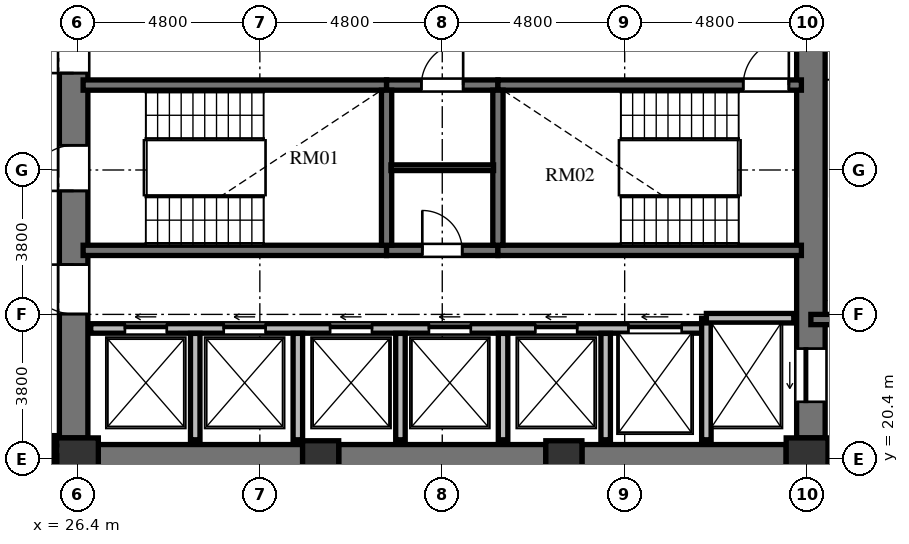
"""IFC4 building model, lengths in metres.
Left out: names, types, materials, properties, quantities, classifications, styles, units other than length and angle.
Written with IfcOpenShell. Run it as: python <this file> out.ifc"""

import sys

from ifc_helpers import new_model, si_unit, direction, frame, frame_2d, origin, origin_2d, place, context, subcontext, project, spatial, rectangle, extrude, element, fill, save


model = new_model("IFC4")
c1 = context("Model", 3, precision=1e-05, world=origin(), true_north=direction((0.0, 1.0)))
c2 = subcontext(c1, "Body", "Model", "MODEL_VIEW")
j1 = project(units=[si_unit("LENGTHUNIT", "METRE"), si_unit("PLANEANGLEUNIT", "RADIAN")], contexts=[c1])
p1 = place(None, origin())
s1 = spatial("IfcSite", under=j1, at=p1, CompositionType="ELEMENT")
p2 = place(p1, origin())
s2 = spatial("IfcBuilding", under=s1, at=p2, CompositionType="ELEMENT")
p3 = place(p2, frame((0.0, 0.0, 85.392)))
s3 = spatial("IfcBuildingStorey", under=s2, at=p3, CompositionType="ELEMENT", Elevation=85.392)
p4 = place(p3, frame((26.4, 20.4, 0.0), z_axis=(0.0, 0.0, 1.0), x_axis=(1.0, 0.0, 0.0)))
e1 = element("IfcColumn", 1, at=p4, inside=s3, PredefinedType="COLUMN", context=c2, shape_type="SweptSolid", body=[
    extrude(rectangle(XDim=1.1, YDim=1.1, at=origin_2d()), origin(), (0.0, 0.0, 1.0), 3.648),
])
for number, where, z_axis, x_axis in (
    (2, (32.8, 20.4, 0.0), (0.0, 0.0, 1.0), (1.0, 0.0, 0.0)),
    (3, (39.2, 20.4, 0.0), (0.0, 0.0, 1.0), (1.0, 0.0, 0.0)),
):
    element("IfcColumn", number, at=place(p3, frame(where, z_axis=z_axis, x_axis=x_axis)), inside=s3, PredefinedType="COLUMN", context=c2, shape_type="SweptSolid", body=[
        extrude(rectangle(XDim=0.95, YDim=0.95, at=origin_2d()), origin(), (0.0, 0.0, 1.0), 3.648),
    ])
p5 = place(p3, frame((45.6, 20.4, 0.0), z_axis=(0.0, 0.0, 1.0), x_axis=(1.0, 0.0, 0.0)))
e4 = element("IfcColumn", 4, at=p5, inside=s3, PredefinedType="COLUMN", context=c2, shape_type="SweptSolid", body=[
    extrude(rectangle(XDim=1.1, YDim=1.1, at=origin_2d()), origin(), (0.0, 0.0, 1.0), 3.648),
])
p6 = place(p3, frame((26.3, 20.95, 0.0), z_axis=(0.0, 0.0, 1.0), x_axis=(0.0, 1.0, 0.0)))
e5 = element("IfcWall", 5, at=p6, inside=s3, PredefinedType="SHEAR", context=c2, shape_type="SweptSolid", body=[
    extrude(rectangle(XDim=14.1, YDim=0.75, at=frame_2d((7.05, 0.0))), origin(), (0.0, 0.0, 1.0), 3.648),
])
p7 = place(p6, frame((6.5, 0.0, 0.0)))
e6 = element("IfcOpeningElement", 6, at=p7, cuts=e5, PredefinedType="OPENING", context=c2, shape_type="SweptSolid", body=[
    extrude(rectangle(XDim=1.2, YDim=2.15, at=frame_2d((0.6, 1.075))), frame((0.0, 0.385, 0.0), z_axis=(0.0, -1.0, 0.0), x_axis=(1.0, 0.0, 0.0)), (0.0, 0.0, 1.0), 0.77),
])
p8 = place(p6, frame((9.6, 0.0, 0.0)))
e7 = element("IfcOpeningElement", 7, at=p8, cuts=e5, PredefinedType="OPENING", context=c2, shape_type="SweptSolid", body=[
    extrude(rectangle(XDim=1.3, YDim=2.2, at=frame_2d((0.65, 1.1))), frame((0.0, 0.385, 0.0), z_axis=(0.0, -1.0, 0.0), x_axis=(1.0, 0.0, 0.0)), (0.0, 0.0, 1.0), 0.77),
])
p9 = place(p6, frame((3.26, 0.0, 0.0)))
e8 = element("IfcOpeningElement", 8, at=p9, cuts=e5, PredefinedType="OPENING", context=c2, shape_type="SweptSolid", body=[
    extrude(rectangle(XDim=1.3, YDim=2.2, at=frame_2d((0.65, 1.1))), frame((0.0, 0.385, 0.0), z_axis=(0.0, -1.0, 0.0), x_axis=(1.0, 0.0, 0.0)), (0.0, 0.0, 1.0), 0.77),
])
p10 = place(p3, frame((45.7, 20.95, 0.0), z_axis=(0.0, 0.0, 1.0), x_axis=(0.0, 1.0, 0.0)))
e9 = element("IfcWall", 9, at=p10, inside=s3, PredefinedType="SHEAR", context=c2, shape_type="SweptSolid", body=[
    extrude(rectangle(XDim=14.1, YDim=0.75, at=frame_2d((7.05, 0.0))), origin(), (0.0, 0.0, 1.0), 3.648),
])
p11 = place(p10, frame((11.75, 0.0, 0.0)))
e10 = element("IfcOpeningElement", 10, at=p11, cuts=e9, PredefinedType="OPENING", context=c2, shape_type="SweptSolid", body=[
    extrude(rectangle(XDim=1.4, YDim=2.3, at=frame_2d((0.7, 1.15))), frame((0.0, 0.385, 0.0), z_axis=(0.0, -1.0, 0.0), x_axis=(1.0, 0.0, 0.0)), (0.0, 0.0, 1.0), 0.77),
])
p12 = place(p10, frame((0.95, 0.0, 0.0)))
e11 = element("IfcOpeningElement", 11, at=p12, cuts=e9, PredefinedType="OPENING", context=c2, shape_type="SweptSolid", body=[
    extrude(rectangle(XDim=1.4, YDim=2.3, at=frame_2d((0.7, 1.15))), frame((0.0, 0.385, 0.0), z_axis=(0.0, -1.0, 0.0), x_axis=(1.0, 0.0, 0.0)), (0.0, 0.0, 1.0), 0.77),
])
p13 = place(p3, frame((26.95, 20.4, 0.0), z_axis=(0.0, 0.0, 1.0), x_axis=(1.0, 0.0, 0.0)))
e12 = element("IfcWall", 12, at=p13, inside=s3, PredefinedType="SHEAR", context=c2, shape_type="SweptSolid", body=[
    extrude(rectangle(XDim=5.375, YDim=0.75, at=frame_2d((2.688, 0.0))), origin(), (0.0, 0.0, 1.0), 3.648),
])
p14 = place(p3, frame((33.275, 20.4, 0.0), z_axis=(0.0, 0.0, 1.0), x_axis=(1.0, 0.0, 0.0)))
e13 = element("IfcWall", 13, at=p14, inside=s3, PredefinedType="SHEAR", context=c2, shape_type="SweptSolid", body=[
    extrude(rectangle(XDim=5.45, YDim=0.75, at=frame_2d((2.725, 0.0))), origin(), (0.0, 0.0, 1.0), 3.648),
])
p15 = place(p3, frame((39.675, 20.4, 0.0), z_axis=(0.0, 0.0, 1.0), x_axis=(1.0, 0.0, 0.0)))
e14 = element("IfcWall", 14, at=p15, inside=s3, PredefinedType="SHEAR", context=c2, shape_type="SweptSolid", body=[
    extrude(rectangle(XDim=5.375, YDim=0.75, at=frame_2d((2.688, 0.0))), origin(), (0.0, 0.0, 1.0), 3.648),
])
p16 = place(p3, frame((26.55, 30.235, 0.0), z_axis=(0.0, 0.0, 1.0), x_axis=(1.0, 0.0, 0.0)))
e15 = element("IfcWall", 15, at=p16, inside=s3, PredefinedType="SHEAR", context=c2, shape_type="SweptSolid", body=[
    extrude(rectangle(XDim=7.985, YDim=0.27, at=frame_2d((3.992, 0.0))), origin(), (0.0, 0.0, 1.0), 3.648),
])
p17 = place(p3, frame((34.535, 30.235, 0.0), z_axis=(0.0, 0.0, 1.0), x_axis=(1.0, 0.0, 0.0)))
e16 = element("IfcWall", 16, at=p17, inside=s3, PredefinedType="SHEAR", context=c2, shape_type="SweptSolid", body=[
    extrude(rectangle(XDim=2.93, YDim=0.27, at=frame_2d((1.465, 0.0))), origin(), (0.0, 0.0, 1.0), 3.648),
])
p18 = place(p17, frame((0.915, 0.0, 0.0)))
e17 = element("IfcOpeningElement", 17, at=p18, cuts=e16, PredefinedType="OPENING", context=c2, shape_type="SweptSolid", body=[
    extrude(rectangle(XDim=1.1, YDim=2.15, at=frame_2d((0.55, 1.075))), frame((0.0, 0.145, 0.0), z_axis=(0.0, -1.0, 0.0), x_axis=(1.0, 0.0, 0.0)), (0.0, 0.0, 1.0), 0.29),
])
p19 = place(p3, frame((37.465, 30.235, 0.0), z_axis=(0.0, 0.0, 1.0), x_axis=(1.0, 0.0, 0.0)))
e18 = element("IfcWall", 18, at=p19, inside=s3, PredefinedType="SHEAR", context=c2, shape_type="SweptSolid", body=[
    extrude(rectangle(XDim=7.985, YDim=0.27, at=frame_2d((3.992, 0.0))), origin(), (0.0, 0.0, 1.0), 3.648),
])
p20 = place(p19, frame((6.455, 0.0, 0.0)))
e19 = element("IfcOpeningElement", 19, at=p20, cuts=e18, PredefinedType="OPENING", context=c2, shape_type="SweptSolid", body=[
    extrude(rectangle(XDim=1.2, YDim=2.15, at=frame_2d((0.6, 1.075))), frame((0.0, 0.145, 0.0), z_axis=(0.0, -1.0, 0.0), x_axis=(1.0, 0.0, 0.0)), (0.0, 0.0, 1.0), 0.29),
])
p21 = place(p3, frame((26.55, 25.885, 0.0), z_axis=(0.0, 0.0, 1.0), x_axis=(1.0, 0.0, 0.0)))
e20 = element("IfcWall", 20, at=p21, inside=s3, PredefinedType="SHEAR", context=c2, shape_type="SweptSolid", body=[
    extrude(rectangle(XDim=7.985, YDim=0.27, at=frame_2d((3.992, 0.0))), origin(), (0.0, 0.0, 1.0), 3.648),
])
p22 = place(p3, frame((34.535, 25.885, 0.0), z_axis=(0.0, 0.0, 1.0), x_axis=(1.0, 0.0, 0.0)))
e21 = element("IfcWall", 21, at=p22, inside=s3, PredefinedType="SHEAR", context=c2, shape_type="SweptSolid", body=[
    extrude(rectangle(XDim=2.93, YDim=0.27, at=frame_2d((1.465, 0.0))), origin(), (0.0, 0.0, 1.0), 3.648),
])
p23 = place(p22, frame((0.94, 0.0, 0.0)))
e22 = element("IfcOpeningElement", 22, at=p23, cuts=e21, PredefinedType="OPENING", context=c2, shape_type="SweptSolid", body=[
    extrude(rectangle(XDim=1.05, YDim=2.15, at=frame_2d((0.525, 1.075))), frame((0.0, 0.145, 0.0), z_axis=(0.0, -1.0, 0.0), x_axis=(1.0, 0.0, 0.0)), (0.0, 0.0, 1.0), 0.29),
])
p24 = place(p3, frame((37.465, 25.885, 0.0), z_axis=(0.0, 0.0, 1.0), x_axis=(1.0, 0.0, 0.0)))
e23 = element("IfcWall", 23, at=p24, inside=s3, PredefinedType="SHEAR", context=c2, shape_type="SweptSolid", body=[
    extrude(rectangle(XDim=7.985, YDim=0.27, at=frame_2d((3.992, 0.0))), origin(), (0.0, 0.0, 1.0), 3.648),
])
for number, where, z_axis, x_axis in (
    (24, (34.535, 26.02, 0.0), (0.0, 0.0, 1.0), (0.0, 1.0, 0.0)),
    (25, (37.465, 26.02, 0.0), (0.0, 0.0, 1.0), (0.0, 1.0, 0.0)),
):
    element("IfcWall", number, at=place(p3, frame(where, z_axis=z_axis, x_axis=x_axis)), inside=s3, PredefinedType="SHEAR", context=c2, shape_type="SweptSolid", body=[
        extrude(rectangle(XDim=4.08, YDim=0.27, at=frame_2d((2.04, 0.0))), origin(), (0.0, 0.0, 1.0), 3.648),
    ])
p25 = place(p3, frame((34.65, 28.06, 0.0), z_axis=(0.0, 0.0, 1.0), x_axis=(1.0, 0.0, 0.0)))
e26 = element("IfcWall", 26, at=p25, inside=s3, PredefinedType="PARTITIONING", context=c2, shape_type="SweptSolid", body=[
    extrude(rectangle(XDim=2.7, YDim=0.15, at=frame_2d((1.35, 0.0))), origin(), (0.0, 0.0, 1.0), 3.428),
])
p26 = place(p3, frame((26.75, 23.83, 0.0), z_axis=(0.0, 0.0, 1.0), x_axis=(1.0, 0.0, 0.0)))
e27 = element("IfcWall", 27, at=p26, inside=s3, PredefinedType="SOLIDWALL", context=c2, shape_type="SweptSolid", body=[
    extrude(rectangle(XDim=16.2, YDim=0.25, at=frame_2d((8.1, 0.0))), origin(), (0.0, 0.0, 1.0), 3.428),
])
p27 = place(p26, frame((0.9, 0.0, 0.0)))
e28 = element("IfcOpeningElement", 28, at=p27, cuts=e27, PredefinedType="OPENING", context=c2, shape_type="SweptSolid", body=[
    extrude(rectangle(XDim=1.1, YDim=2.2, at=frame_2d((0.55, 1.1))), frame((0.0, 0.135, 0.0), z_axis=(0.0, -1.0, 0.0), x_axis=(1.0, 0.0, 0.0)), (0.0, 0.0, 1.0), 0.27),
])
p28 = place(p26, frame((3.5, 0.0, 0.0)))
e29 = element("IfcOpeningElement", 29, at=p28, cuts=e27, PredefinedType="OPENING", context=c2, shape_type="SweptSolid", body=[
    extrude(rectangle(XDim=1.1, YDim=2.2, at=frame_2d((0.55, 1.1))), frame((0.0, 0.135, 0.0), z_axis=(0.0, -1.0, 0.0), x_axis=(1.0, 0.0, 0.0)), (0.0, 0.0, 1.0), 0.27),
])
p29 = place(p26, frame((6.3, 0.0, 0.0)))
e30 = element("IfcOpeningElement", 30, at=p29, cuts=e27, PredefinedType="OPENING", context=c2, shape_type="SweptSolid", body=[
    extrude(rectangle(XDim=1.1, YDim=2.2, at=frame_2d((0.55, 1.1))), frame((0.0, 0.135, 0.0), z_axis=(0.0, -1.0, 0.0), x_axis=(1.0, 0.0, 0.0)), (0.0, 0.0, 1.0), 0.27),
])
p30 = place(p26, frame((8.9, 0.0, 0.0)))
e31 = element("IfcOpeningElement", 31, at=p30, cuts=e27, PredefinedType="OPENING", context=c2, shape_type="SweptSolid", body=[
    extrude(rectangle(XDim=1.1, YDim=2.2, at=frame_2d((0.55, 1.1))), frame((0.0, 0.135, 0.0), z_axis=(0.0, -1.0, 0.0), x_axis=(1.0, 0.0, 0.0)), (0.0, 0.0, 1.0), 0.27),
])
p31 = place(p26, frame((11.7, 0.0, 0.0)))
e32 = element("IfcOpeningElement", 32, at=p31, cuts=e27, PredefinedType="OPENING", context=c2, shape_type="SweptSolid", body=[
    extrude(rectangle(XDim=1.1, YDim=2.2, at=frame_2d((0.55, 1.1))), frame((0.0, 0.135, 0.0), z_axis=(0.0, -1.0, 0.0), x_axis=(1.0, 0.0, 0.0)), (0.0, 0.0, 1.0), 0.27),
])
p32 = place(p26, frame((14.15, 0.0, 0.0)))
e33 = element("IfcOpeningElement", 33, at=p32, cuts=e27, PredefinedType="OPENING", context=c2, shape_type="SweptSolid", body=[
    extrude(rectangle(XDim=1.4, YDim=2.3, at=frame_2d((0.7, 1.15))), frame((0.0, 0.135, 0.0), z_axis=(0.0, -1.0, 0.0), x_axis=(1.0, 0.0, 0.0)), (0.0, 0.0, 1.0), 0.27),
])
p33 = place(p3, frame((42.95, 20.9, 0.0), z_axis=(0.0, 0.0, 1.0), x_axis=(0.0, 1.0, 0.0)))
e34 = element("IfcWall", 34, at=p33, inside=s3, PredefinedType="SOLIDWALL", context=c2, shape_type="SweptSolid", body=[
    extrude(rectangle(XDim=3.2, YDim=0.25, at=frame_2d((1.6, 0.0))), origin(), (0.0, 0.0, 1.0), 3.428),
])
p34 = place(p3, frame((42.95, 24.1, 0.0), z_axis=(0.0, 0.0, 1.0), x_axis=(1.0, 0.0, 0.0)))
e35 = element("IfcWall", 35, at=p34, inside=s3, PredefinedType="SOLIDWALL", context=c2, shape_type="SweptSolid", body=[
    extrude(rectangle(XDim=2.3, YDim=0.25, at=frame_2d((1.15, 0.0))), origin(), (0.0, 0.0, 1.0), 3.428),
])
for number, where, z_axis, x_axis in (
    (36, (29.5, 20.9, 0.0), (0.0, 0.0, 1.0), (0.0, 1.0, 0.0)),
    (37, (32.2, 20.9, 0.0), (0.0, 0.0, 1.0), (0.0, 1.0, 0.0)),
    (38, (34.9, 20.9, 0.0), (0.0, 0.0, 1.0), (0.0, 1.0, 0.0)),
    (39, (37.6, 20.9, 0.0), (0.0, 0.0, 1.0), (0.0, 1.0, 0.0)),
    (40, (40.3, 20.9, 0.0), (0.0, 0.0, 1.0), (0.0, 1.0, 0.0)),
):
    element("IfcWall", number, at=place(p3, frame(where, z_axis=z_axis, x_axis=x_axis)), inside=s3, PredefinedType="SOLIDWALL", context=c2, shape_type="SweptSolid", body=[
        extrude(rectangle(XDim=2.8, YDim=0.25, at=frame_2d((1.4, 0.0))), origin(), (0.0, 0.0, 1.0), 3.428),
    ])
p35 = place(p3, frame((45.7, 24.065, 0.0), z_axis=(0.0, 0.0, 1.0), x_axis=(1.0, 0.0, 0.0)))
e41 = element("IfcWall", 41, at=p35, inside=s3, PredefinedType="SHEAR", context=c2, shape_type="SweptSolid", body=[
    extrude(rectangle(XDim=4.715, YDim=0.27, at=frame_2d((2.357, 0.0))), origin(), (0.0, 0.0, 1.0), 3.648),
])
p36 = place(p3, frame((25.83, 21.01, 0.0), z_axis=(0.0, 0.0, 1.0), x_axis=(0.0, -1.0, 0.0)))
e42 = element("IfcWall", 42, at=p36, inside=s3, PredefinedType="PARTITIONING", context=c2, shape_type="SweptSolid", body=[
    extrude(rectangle(XDim=1.22, YDim=0.18, at=frame_2d((0.61, 0.0))), origin(), (0.0, 0.0, 1.0), 3.428),
])
p37 = place(p7, origin())
e43 = element("IfcDoor", 43, at=p37, inside=s3, OperationType="SINGLE_SWING_LEFT", PredefinedType="DOOR", context=c2, shape_type="SweptSolid", body=[
    extrude(rectangle(XDim=1.2, YDim=2.15, at=frame_2d((0.6, 1.075))), frame((0.0, 0.025, 0.0), z_axis=(0.0, -1.0, 0.0), x_axis=(1.0, 0.0, 0.0)), (0.0, 0.0, 1.0), 0.05),
])
fill(e6, e43)
p38 = place(p20, origin())
e44 = element("IfcDoor", 44, at=p38, inside=s3, OperationType="SINGLE_SWING_RIGHT", PredefinedType="DOOR", context=c2, shape_type="SweptSolid", body=[
    extrude(rectangle(XDim=1.2, YDim=2.15, at=frame_2d((0.6, 1.075))), frame((0.0, 0.025, 0.0), z_axis=(0.0, -1.0, 0.0), x_axis=(1.0, 0.0, 0.0)), (0.0, 0.0, 1.0), 0.05),
])
fill(e19, e44)
p39 = place(p23, origin())
e45 = element("IfcDoor", 45, at=p39, inside=s3, OperationType="SINGLE_SWING_LEFT", PredefinedType="DOOR", context=c2, shape_type="SweptSolid", body=[
    extrude(rectangle(XDim=1.05, YDim=2.15, at=frame_2d((0.525, 1.075))), frame((0.0, 0.025, 0.0), z_axis=(0.0, -1.0, 0.0), x_axis=(1.0, 0.0, 0.0)), (0.0, 0.0, 1.0), 0.05),
])
fill(e22, e45)
p40 = place(p18, origin())
e46 = element("IfcDoor", 46, at=p40, inside=s3, OperationType="SINGLE_SWING_RIGHT", PredefinedType="DOOR", context=c2, shape_type="SweptSolid", body=[
    extrude(rectangle(XDim=1.1, YDim=2.15, at=frame_2d((0.55, 1.075))), frame((0.0, 0.025, 0.0), z_axis=(0.0, -1.0, 0.0), x_axis=(1.0, 0.0, 0.0)), (0.0, 0.0, 1.0), 0.05),
])
fill(e17, e46)
p41 = place(p8, origin())
e47 = element("IfcDoor", 47, at=p41, inside=s3, OperationType="SINGLE_SWING_LEFT", PredefinedType="DOOR", context=c2, shape_type="SweptSolid", body=[
    extrude(rectangle(XDim=1.3, YDim=2.2, at=frame_2d((0.65, 1.1))), frame((0.0, 0.025, 0.0), z_axis=(0.0, -1.0, 0.0), x_axis=(1.0, 0.0, 0.0)), (0.0, 0.0, 1.0), 0.05),
])
fill(e7, e47)
p42 = place(p9, origin())
e48 = element("IfcDoor", 48, at=p42, inside=s3, OperationType="SINGLE_SWING_RIGHT", PredefinedType="DOOR", context=c2, shape_type="SweptSolid", body=[
    extrude(rectangle(XDim=1.3, YDim=2.2, at=frame_2d((0.65, 1.1))), frame((0.0, 0.025, 0.0), z_axis=(0.0, -1.0, 0.0), x_axis=(1.0, 0.0, 0.0)), (0.0, 0.0, 1.0), 0.05),
])
fill(e8, e48)
p43 = place(p27, origin())
e49 = element("IfcDoor", 49, at=p43, inside=s3, OperationType="SLIDING_TO_LEFT", PredefinedType="DOOR", context=c2, shape_type="SweptSolid", body=[
    extrude(rectangle(XDim=1.1, YDim=2.2, at=frame_2d((0.55, 1.1))), frame((0.0, 0.025, 0.0), z_axis=(0.0, -1.0, 0.0), x_axis=(1.0, 0.0, 0.0)), (0.0, 0.0, 1.0), 0.05),
])
fill(e28, e49)
p44 = place(p28, origin())
e50 = element("IfcDoor", 50, at=p44, inside=s3, OperationType="SLIDING_TO_LEFT", PredefinedType="DOOR", context=c2, shape_type="SweptSolid", body=[
    extrude(rectangle(XDim=1.1, YDim=2.2, at=frame_2d((0.55, 1.1))), frame((0.0, 0.025, 0.0), z_axis=(0.0, -1.0, 0.0), x_axis=(1.0, 0.0, 0.0)), (0.0, 0.0, 1.0), 0.05),
])
fill(e29, e50)
p45 = place(p29, origin())
e51 = element("IfcDoor", 51, at=p45, inside=s3, OperationType="SLIDING_TO_LEFT", PredefinedType="DOOR", context=c2, shape_type="SweptSolid", body=[
    extrude(rectangle(XDim=1.1, YDim=2.2, at=frame_2d((0.55, 1.1))), frame((0.0, 0.025, 0.0), z_axis=(0.0, -1.0, 0.0), x_axis=(1.0, 0.0, 0.0)), (0.0, 0.0, 1.0), 0.05),
])
fill(e30, e51)
p46 = place(p30, origin())
e52 = element("IfcDoor", 52, at=p46, inside=s3, OperationType="SLIDING_TO_LEFT", PredefinedType="DOOR", context=c2, shape_type="SweptSolid", body=[
    extrude(rectangle(XDim=1.1, YDim=2.2, at=frame_2d((0.55, 1.1))), frame((0.0, 0.025, 0.0), z_axis=(0.0, -1.0, 0.0), x_axis=(1.0, 0.0, 0.0)), (0.0, 0.0, 1.0), 0.05),
])
fill(e31, e52)
p47 = place(p31, origin())
e53 = element("IfcDoor", 53, at=p47, inside=s3, OperationType="SLIDING_TO_LEFT", PredefinedType="DOOR", context=c2, shape_type="SweptSolid", body=[
    extrude(rectangle(XDim=1.1, YDim=2.2, at=frame_2d((0.55, 1.1))), frame((0.0, 0.025, 0.0), z_axis=(0.0, -1.0, 0.0), x_axis=(1.0, 0.0, 0.0)), (0.0, 0.0, 1.0), 0.05),
])
fill(e32, e53)
p48 = place(p12, origin())
e54 = element("IfcDoor", 54, at=p48, inside=s3, OperationType="SLIDING_TO_LEFT", PredefinedType="DOOR", context=c2, shape_type="SweptSolid", body=[
    extrude(rectangle(XDim=1.4, YDim=2.3, at=frame_2d((0.7, 1.15))), frame((0.0, 0.025, 0.0), z_axis=(0.0, -1.0, 0.0), x_axis=(1.0, 0.0, 0.0)), (0.0, 0.0, 1.0), 0.05),
])
fill(e11, e54)
p49 = place(p32, origin())
e55 = element("IfcDoor", 55, at=p49, inside=s3, OperationType="SLIDING_TO_LEFT", PredefinedType="DOOR", context=c2, shape_type="SweptSolid", body=[
    extrude(rectangle(XDim=1.4, YDim=2.3, at=frame_2d((0.7, 1.15))), frame((0.0, 0.025, 0.0), z_axis=(0.0, -1.0, 0.0), x_axis=(1.0, 0.0, 0.0)), (0.0, 0.0, 1.0), 0.05),
])
fill(e33, e55)
save(model, sys.argv[1])
